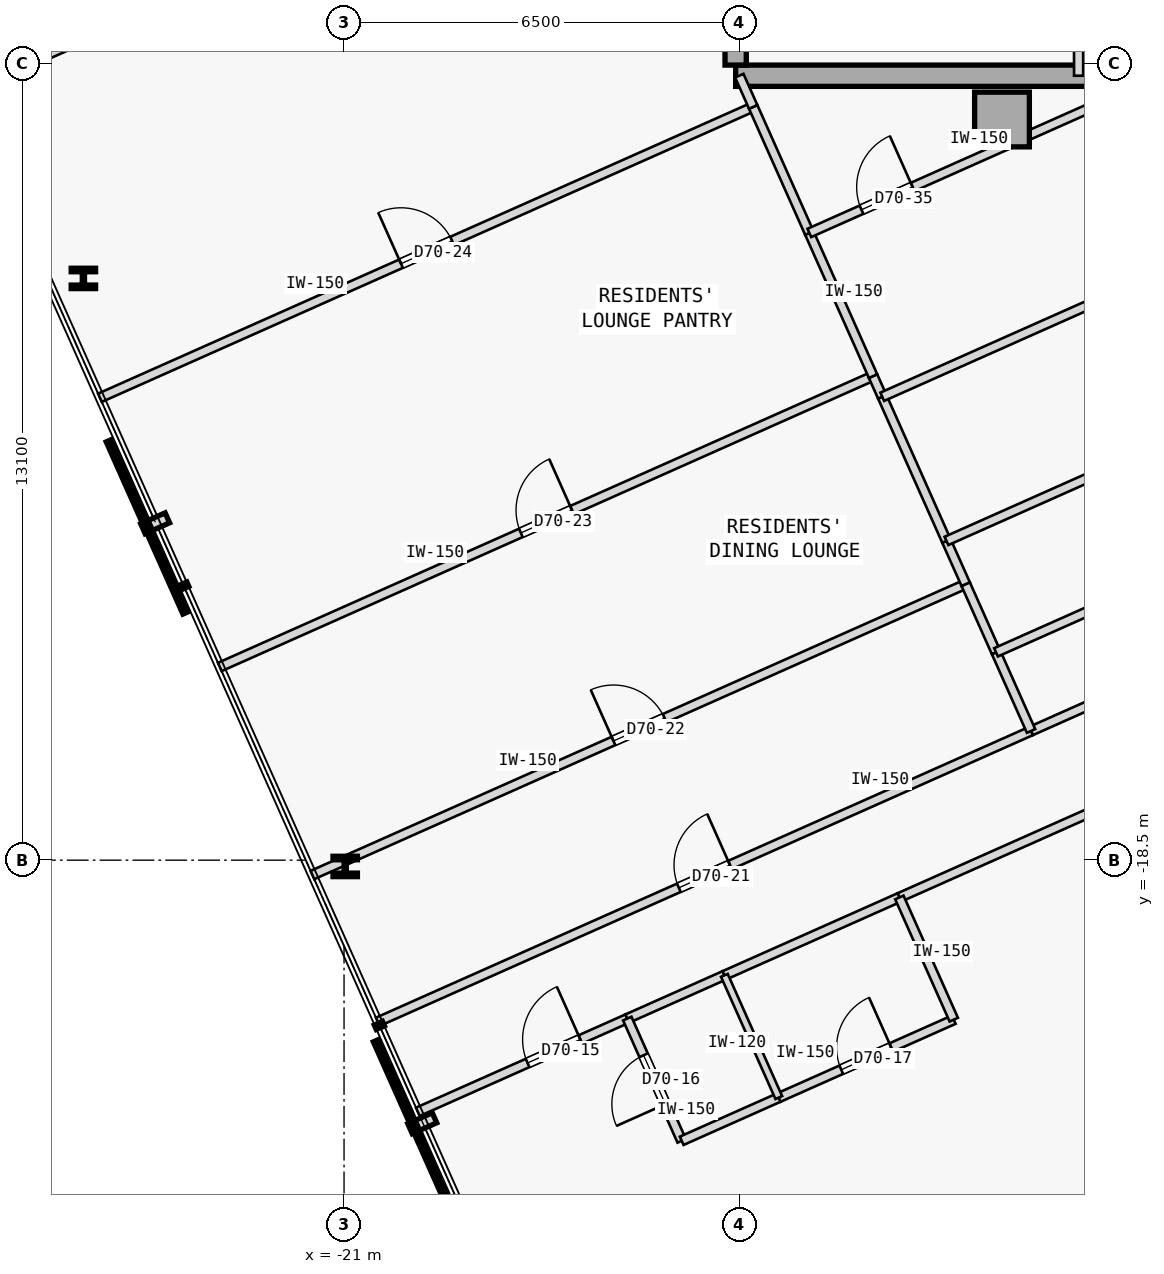
"""IFC4 building model, lengths in metres.
Left out: names, types, materials, properties, quantities, classifications, styles, units other than length and angle.
Written with IfcOpenShell. Run it as: python <this file> out.ifc"""

import sys

from ifc_helpers import new_model, si_unit, direction, frame, frame_2d, origin, origin_2d, place, context, subcontext, project, spatial, rectangle, i_section, extrude, element, fill, save


model = new_model("IFC4")
c1 = context("Model", 3, precision=1e-05, world=origin(), true_north=direction((0.0, 1.0)))
c2 = subcontext(c1, "Body", "Model", "MODEL_VIEW")
j1 = project(units=[si_unit("LENGTHUNIT", "METRE"), si_unit("PLANEANGLEUNIT", "RADIAN")], contexts=[c1])
p1 = place(None, origin())
s1 = spatial("IfcSite", under=j1, at=p1, CompositionType="ELEMENT")
p2 = place(p1, origin())
s2 = spatial("IfcBuilding", under=s1, at=p2, CompositionType="ELEMENT")
p3 = place(p2, frame((0.0, 0.0, 262.2)))
s3 = spatial("IfcBuildingStorey", under=s2, at=p3, CompositionType="ELEMENT", Elevation=262.2)
p4 = place(p3, frame((-10.18, -6.32, 0.0), z_axis=(0.0, 0.0, 1.0), x_axis=(1.0, 0.0, 0.0)))
e1 = element("IfcColumn", 1, at=p4, inside=s3, PredefinedType="COLUMN", context=c2, shape_type="SweptSolid", body=[
    extrude(rectangle(XDim=0.9, YDim=0.9, at=origin_2d()), origin(), (0.0, 0.0, 1.0), 3.35),
])
p5 = place(p3, frame((-14.56, -5.6, 0.0), z_axis=(0.0, 0.0, 1.0), x_axis=(1.0, 0.0, 0.0)))
e2 = element("IfcWall", 2, at=p5, inside=s3, PredefinedType="SHEAR", context=c2, shape_type="SweptSolid", body=[
    extrude(rectangle(XDim=10.86, YDim=0.35, at=frame_2d((5.43, 0.0))), origin(), (0.0, 0.0, 1.0), 3.125),
])
p6 = place(p3, frame((-14.56, -5.425, 0.0), z_axis=(0.0, 0.0, 1.0), x_axis=(0.0, 1.0, 0.0)))
e3 = element("IfcWall", 3, at=p6, inside=s3, PredefinedType="SHEAR", context=c2, shape_type="SweptSolid", body=[
    extrude(rectangle(XDim=10.85, YDim=0.35, at=frame_2d((5.425, 0.0))), origin(), (0.0, 0.0, 1.0), 3.125),
])
for number, where, z_axis, x_axis in (
    (4, (-25.286, -8.933, 0.0), (0.0, 0.0, 1.0), (1.0, 0.0, 0.0)),
    (5, (-20.981, -18.603, 0.0), (0.0, 0.0, 1.0), (1.0, 0.0, 0.0)),
):
    element("IfcColumn", number, at=place(p3, frame(where, z_axis=z_axis, x_axis=x_axis)), inside=s3, PredefinedType="COLUMN", context=c2, shape_type="SweptSolid", body=[
        extrude(i_section(OverallWidth=0.401, OverallDepth=0.335, WebThickness=0.036, FlangeThickness=0.058, FilletRadius=0.015, at=origin_2d()), origin(), (0.0, 0.0, 1.0), 3.35),
    ])
p7 = place(p3, frame((-8.92, -5.6, 0.0), z_axis=(0.0, 0.0, 1.0), x_axis=(0.0, 1.0, 0.0)))
e6 = element("IfcWall", 6, at=p7, inside=s3, PredefinedType="PARTITIONING", context=c2, shape_type="SweptSolid", body=[
    extrude(rectangle(XDim=2.65, YDim=0.15, at=frame_2d((1.325, 0.0))), origin(), (0.0, 0.0, 1.0), 3.125),
])
p8 = place(p3, frame((-19.786, -22.639, 0.0), z_axis=(0.0, 0.0, 1.0), x_axis=(0.913541633228, 0.406745232743, 0.0)))
e7 = element("IfcWall", 7, at=p8, inside=s3, PredefinedType="PARTITIONING", context=c2, shape_type="SweptSolid", body=[
    extrude(rectangle(XDim=3.77, YDim=0.15, at=frame_2d((1.885, 0.0))), origin(), (0.0, 0.0, 1.0), 3.125),
])
p9 = place(p8, frame((1.976, 0.0, 0.0)))
e8 = element("IfcOpeningElement", 8, at=p9, cuts=e7, PredefinedType="OPENING", context=c2, shape_type="SweptSolid", body=[
    extrude(rectangle(XDim=0.95, YDim=2.15, at=frame_2d((0.475, 1.075))), frame((0.0, 0.085, 0.0), z_axis=(0.0, -1.0, 0.0), x_axis=(1.0, 0.0, 0.0)), (0.0, 0.0, 1.0), 0.17),
])
p10 = place(p3, frame((-11.868, -19.113, 0.0), z_axis=(0.0, 0.0, 1.0), x_axis=(0.913543802, 0.40674036169, 0.0)))
e9 = element("IfcWall", 9, at=p10, inside=s3, PredefinedType="PARTITIONING", context=c2, shape_type="SweptSolid", body=[
    extrude(rectangle(XDim=3.65, YDim=0.15, at=frame_2d((1.825, 0.0))), origin(), (0.0, 0.0, 1.0), 3.125),
])
p11 = place(p3, frame((-16.342, -21.105, 0.0), z_axis=(0.0, 0.0, 1.0), x_axis=(0.9135579554, 0.406708571492, 0.0)))
e10 = element("IfcWall", 10, at=p11, inside=s3, PredefinedType="PARTITIONING", context=c2, shape_type="SweptSolid", body=[
    extrude(rectangle(XDim=1.748, YDim=0.15, at=frame_2d((0.874, 0.0))), origin(), (0.0, 0.0, 1.0), 3.125),
])
p12 = place(p3, frame((-14.745, -20.394, 0.0), z_axis=(0.0, 0.0, 1.0), x_axis=(0.913542880558, 0.406742431252, 0.0)))
e11 = element("IfcWall", 11, at=p12, inside=s3, PredefinedType="PARTITIONING", context=c2, shape_type="SweptSolid", body=[
    extrude(rectangle(XDim=3.15, YDim=0.15, at=frame_2d((1.575, 0.0))), origin(), (0.0, 0.0, 1.0), 3.125),
])
p13 = place(p3, frame((-20.445, -21.159, 0.0), z_axis=(0.0, 0.0, 1.0), x_axis=(0.913547681516, 0.406731648137, 0.0)))
e12 = element("IfcWall", 12, at=p13, inside=s3, PredefinedType="PARTITIONING", context=c2, shape_type="SweptSolid", body=[
    extrude(rectangle(XDim=11.76, YDim=0.15, at=frame_2d((5.88, 0.0))), origin(), (0.0, 0.0, 1.0), 3.125),
])
p14 = place(p13, frame((5.42, 0.0, 0.0)))
e13 = element("IfcOpeningElement", 13, at=p14, cuts=e12, PredefinedType="OPENING", context=c2, shape_type="SweptSolid", body=[
    extrude(rectangle(XDim=0.92, YDim=2.15, at=frame_2d((0.46, 1.075))), frame((0.0, 0.085, 0.0), z_axis=(0.0, -1.0, 0.0), x_axis=(1.0, 0.0, 0.0)), (0.0, 0.0, 1.0), 0.17),
])
p15 = place(p3, frame((-9.702, -16.375, 0.0), z_axis=(0.0, 0.0, 1.0), x_axis=(0.913552389019, 0.406721074594, 0.0)))
e14 = element("IfcWall", 14, at=p15, inside=s3, PredefinedType="PARTITIONING", context=c2, shape_type="SweptSolid", body=[
    extrude(rectangle(XDim=6.57, YDim=0.15, at=frame_2d((3.285, 0.0))), origin(), (0.0, 0.0, 1.0), 3.125),
])
p16 = place(p15, frame((2.825, 0.0, 0.0)))
e15 = element("IfcOpeningElement", 15, at=p16, cuts=e14, PredefinedType="OPENING", context=c2, shape_type="SweptSolid", body=[
    extrude(rectangle(XDim=0.92, YDim=2.15, at=frame_2d((0.46, 1.075))), frame((0.0, 0.085, 0.0), z_axis=(0.0, -1.0, 0.0), x_axis=(1.0, 0.0, 0.0)), (0.0, 0.0, 1.0), 0.17),
])
p17 = place(p3, frame((-15.448, -23.115, 0.0), z_axis=(0.0, 0.0, 1.0), x_axis=(-0.406725294076, 0.913550510459, 0.0)))
e16 = element("IfcWall", 16, at=p17, inside=s3, PredefinedType="PARTITIONING", context=c2, shape_type="SweptSolid", body=[
    extrude(rectangle(XDim=2.2, YDim=0.15, at=frame_2d((1.1, 0.0))), origin(), (0.0, 0.0, 1.0), 3.125),
])
p18 = place(p17, frame((0.66, 0.0, 0.0)))
e17 = element("IfcOpeningElement", 17, at=p18, cuts=e16, PredefinedType="OPENING", context=c2, shape_type="SweptSolid", body=[
    extrude(rectangle(XDim=0.88, YDim=2.15, at=frame_2d((0.44, 1.075))), frame((0.0, 0.085, 0.0), z_axis=(0.0, -1.0, 0.0), x_axis=(1.0, 0.0, 0.0)), (0.0, 0.0, 1.0), 0.17),
])
p19 = place(p3, frame((-15.448, -23.115, 0.0), z_axis=(0.0, 0.0, 1.0), x_axis=(0.9135579554, 0.406708571492, 0.0)))
e18 = element("IfcWall", 18, at=p19, inside=s3, PredefinedType="PARTITIONING", context=c2, shape_type="SweptSolid", body=[
    extrude(rectangle(XDim=1.748, YDim=0.15, at=frame_2d((0.874, 0.0))), origin(), (0.0, 0.0, 1.0), 3.125),
])
p20 = place(p3, frame((-13.851, -22.404, 0.0), z_axis=(0.0, 0.0, 1.0), x_axis=(0.913542880558, 0.406742431252, 0.0)))
e19 = element("IfcWall", 19, at=p20, inside=s3, PredefinedType="PARTITIONING", context=c2, shape_type="SweptSolid", body=[
    extrude(rectangle(XDim=3.15, YDim=0.15, at=frame_2d((1.575, 0.0))), origin(), (0.0, 0.0, 1.0), 3.125),
])
p21 = place(p20, frame((1.125, 0.0, 0.0)))
e20 = element("IfcOpeningElement", 20, at=p21, cuts=e19, PredefinedType="OPENING", context=c2, shape_type="SweptSolid", body=[
    extrude(rectangle(XDim=0.9, YDim=2.15, at=frame_2d((0.45, 1.075))), frame((0.0, 0.085, 0.0), z_axis=(0.0, -1.0, 0.0), x_axis=(1.0, 0.0, 0.0)), (0.0, 0.0, 1.0), 0.17),
])
p22 = place(p3, frame((-10.973, -21.123, 0.0), z_axis=(0.0, 0.0, 1.0), x_axis=(-0.406725294076, 0.913550510459, 0.0)))
e21 = element("IfcWall", 21, at=p22, inside=s3, PredefinedType="PARTITIONING", context=c2, shape_type="SweptSolid", body=[
    extrude(rectangle(XDim=2.2, YDim=0.15, at=frame_2d((1.1, 0.0))), origin(), (0.0, 0.0, 1.0), 3.125),
])
p23 = place(p3, frame((-13.851, -22.404, 0.0), z_axis=(0.0, 0.0, 1.0), x_axis=(-0.406725294076, 0.913550510459, 0.0)))
e22 = element("IfcWall", 22, at=p23, inside=s3, PredefinedType="PARTITIONING", context=c2, shape_type="SweptSolid", body=[
    extrude(rectangle(XDim=2.2, YDim=0.12, at=frame_2d((1.1, 0.0))), origin(), (0.0, 0.0, 1.0), 3.125),
])
p24 = place(p3, frame((-21.52, -18.744, 0.0), z_axis=(0.0, 0.0, 1.0), x_axis=(0.913539967617, 0.406748973651, 0.0)))
e23 = element("IfcWall", 23, at=p24, inside=s3, PredefinedType="PARTITIONING", context=c2, shape_type="SweptSolid", body=[
    extrude(rectangle(XDim=11.76, YDim=0.15, at=frame_2d((5.88, 0.0))), origin(), (0.0, 0.0, 1.0), 3.125),
])
p25 = place(p24, frame((5.42, 0.0, 0.0)))
e24 = element("IfcOpeningElement", 24, at=p25, cuts=e23, PredefinedType="OPENING", context=c2, shape_type="SweptSolid", body=[
    extrude(rectangle(XDim=0.92, YDim=2.15, at=frame_2d((0.46, 1.075))), frame((0.0, 0.085, 0.0), z_axis=(0.0, -1.0, 0.0), x_axis=(1.0, 0.0, 0.0)), (0.0, 0.0, 1.0), 0.17),
])
p26 = place(p3, frame((-9.702, -16.375, 0.0), z_axis=(0.0, 0.0, 1.0), x_axis=(-0.406762319034, 0.913534025537, 0.0)))
e25 = element("IfcWall", 25, at=p26, inside=s3, PredefinedType="PARTITIONING", context=c2, shape_type="SweptSolid", body=[
    extrude(rectangle(XDim=1.416, YDim=0.15, at=frame_2d((0.708, 0.0))), origin(), (0.0, 0.0, 1.0), 3.125),
])
p27 = place(p3, frame((-10.278, -15.082, 0.0), z_axis=(0.0, 0.0, 1.0), x_axis=(-0.406655262741, 0.913581686159, 0.0)))
e26 = element("IfcWall", 26, at=p27, inside=s3, PredefinedType="PARTITIONING", context=c2, shape_type="SweptSolid", body=[
    extrude(rectangle(XDim=1.227, YDim=0.15, at=frame_2d((0.614, 0.0))), origin(), (0.0, 0.0, 1.0), 3.125),
])
p28 = place(p3, frame((-23.043, -15.323, 0.0), z_axis=(0.0, 0.0, 1.0), x_axis=(0.913547681516, 0.406731648137, 0.0)))
e27 = element("IfcWall", 27, at=p28, inside=s3, PredefinedType="PARTITIONING", context=c2, shape_type="SweptSolid", body=[
    extrude(rectangle(XDim=11.76, YDim=0.15, at=frame_2d((5.88, 0.0))), origin(), (0.0, 0.0, 1.0), 3.125),
])
p29 = place(p28, frame((5.42, 0.0, 0.0)))
e28 = element("IfcOpeningElement", 28, at=p29, cuts=e27, PredefinedType="OPENING", context=c2, shape_type="SweptSolid", body=[
    extrude(rectangle(XDim=0.92, YDim=2.15, at=frame_2d((0.46, 1.075))), frame((0.0, 0.085, 0.0), z_axis=(0.0, -1.0, 0.0), x_axis=(1.0, 0.0, 0.0)), (0.0, 0.0, 1.0), 0.17),
])
p30 = place(p3, frame((-10.777, -13.961, 0.0), z_axis=(0.0, 0.0, 1.0), x_axis=(-0.406720744325, 0.913552536057, 0.0)))
e29 = element("IfcWall", 29, at=p30, inside=s3, PredefinedType="PARTITIONING", context=c2, shape_type="SweptSolid", body=[
    extrude(rectangle(XDim=0.778, YDim=0.15, at=frame_2d((0.389, 0.0))), origin(), (0.0, 0.0, 1.0), 3.125),
])
p31 = place(p3, frame((-11.093, -13.25, 0.0), z_axis=(0.0, 0.0, 1.0), x_axis=(-0.406723252866, 0.91355141923, 0.0)))
e30 = element("IfcWall", 30, at=p31, inside=s3, PredefinedType="PARTITIONING", context=c2, shape_type="SweptSolid", body=[
    extrude(rectangle(XDim=2.595, YDim=0.15, at=frame_2d((1.297, 0.0))), origin(), (0.0, 0.0, 1.0), 3.125),
])
p32 = place(p3, frame((-12.149, -10.88, 0.0), z_axis=(0.0, 0.0, 1.0), x_axis=(-0.406868995548, 0.913486519037, 0.0)))
e31 = element("IfcWall", 31, at=p32, inside=s3, PredefinedType="PARTITIONING", context=c2, shape_type="SweptSolid", body=[
    extrude(rectangle(XDim=0.372, YDim=0.15, at=frame_2d((0.186, 0.0))), origin(), (0.0, 0.0, 1.0), 3.125),
])
p33 = place(p3, frame((-25.014, -10.896, 0.0), z_axis=(0.0, 0.0, 1.0), x_axis=(0.913544247064, 0.406739362069, 0.0)))
e32 = element("IfcWall", 32, at=p33, inside=s3, PredefinedType="PARTITIONING", context=c2, shape_type="SweptSolid", body=[
    extrude(rectangle(XDim=11.76, YDim=0.15, at=frame_2d((5.88, 0.0))), origin(), (0.0, 0.0, 1.0), 3.125),
])
p34 = place(p33, frame((5.42, 0.0, 0.0)))
e33 = element("IfcOpeningElement", 33, at=p34, cuts=e32, PredefinedType="OPENING", context=c2, shape_type="SweptSolid", body=[
    extrude(rectangle(XDim=0.92, YDim=2.15, at=frame_2d((0.46, 1.075))), frame((0.0, 0.085, 0.0), z_axis=(0.0, -1.0, 0.0), x_axis=(1.0, 0.0, 0.0)), (0.0, 0.0, 1.0), 0.17),
])
p35 = place(p3, frame((-12.3, -10.54, 0.0), z_axis=(0.0, 0.0, 1.0), x_axis=(-0.406788806475, 0.913522231216, 0.0)))
e34 = element("IfcWall", 34, at=p35, inside=s3, PredefinedType="PARTITIONING", context=c2, shape_type="SweptSolid", body=[
    extrude(rectangle(XDim=2.577, YDim=0.15, at=frame_2d((1.289, 0.0))), origin(), (0.0, 0.0, 1.0), 3.125),
])
p36 = place(p3, frame((-13.348, -8.186, 0.0), z_axis=(0.0, 0.0, 1.0), x_axis=(-0.40673740295, 0.913545119324, 0.0)))
e35 = element("IfcWall", 35, at=p36, inside=s3, PredefinedType="PARTITIONING", context=c2, shape_type="SweptSolid", body=[
    extrude(rectangle(XDim=2.269, YDim=0.15, at=frame_2d((1.134, 0.0))), origin(), (0.0, 0.0, 1.0), 3.125),
])
p37 = place(p3, frame((-27.254, -5.865, 0.0), z_axis=(0.0, 0.0, 1.0), x_axis=(0.913547681516, 0.406731648137, 0.0)))
e36 = element("IfcWall", 36, at=p37, inside=s3, PredefinedType="PARTITIONING", context=c2, shape_type="SweptSolid", body=[
    extrude(rectangle(XDim=11.76, YDim=0.15, at=frame_2d((5.88, 0.0))), origin(), (0.0, 0.0, 1.0), 3.125),
])
p38 = place(p3, frame((-14.271, -6.113, 0.0), z_axis=(0.0, 0.0, 1.0), x_axis=(-0.406622099206, 0.913596447255, 0.0)))
e37 = element("IfcWall", 37, at=p38, inside=s3, PredefinedType="PARTITIONING", context=c2, shape_type="SweptSolid", body=[
    extrude(rectangle(XDim=0.562, YDim=0.15, at=frame_2d((0.281, 0.0))), origin(), (0.0, 0.0, 1.0), 3.125),
])
p39 = place(p3, frame((-10.278, -15.082, 0.0), z_axis=(0.0, 0.0, 1.0), x_axis=(0.913549882956, 0.406726703513, 0.0)))
e38 = element("IfcWall", 38, at=p39, inside=s3, PredefinedType="PARTITIONING", context=c2, shape_type="SweptSolid", body=[
    extrude(rectangle(XDim=7.2, YDim=0.15, at=frame_2d((3.6, 0.0))), origin(), (0.0, 0.0, 1.0), 3.125),
])
p40 = place(p3, frame((-11.093, -13.25, 0.0), z_axis=(0.0, 0.0, 1.0), x_axis=(0.913543891457, 0.406740160767, 0.0)))
e39 = element("IfcWall", 39, at=p40, inside=s3, PredefinedType="PARTITIONING", context=c2, shape_type="SweptSolid", body=[
    extrude(rectangle(XDim=8.093, YDim=0.15, at=frame_2d((4.046, 0.0))), origin(), (0.0, 0.0, 1.0), 3.125),
])
p41 = place(p3, frame((-12.149, -10.88, 0.0), z_axis=(0.0, 0.0, 1.0), x_axis=(0.913542450291, 0.406743397631, 0.0)))
e40 = element("IfcWall", 40, at=p41, inside=s3, PredefinedType="PARTITIONING", context=c2, shape_type="SweptSolid", body=[
    extrude(rectangle(XDim=9.248, YDim=0.15, at=frame_2d((4.624, 0.0))), origin(), (0.0, 0.0, 1.0), 3.125),
])
p42 = place(p3, frame((-13.348, -8.186, 0.0), z_axis=(0.0, 0.0, 1.0), x_axis=(0.913551673432, 0.406722681896, 0.0)))
e41 = element("IfcWall", 41, at=p42, inside=s3, PredefinedType="PARTITIONING", context=c2, shape_type="SweptSolid", body=[
    extrude(rectangle(XDim=6.358, YDim=0.15, at=frame_2d((3.179, 0.0))), origin(), (0.0, 0.0, 1.0), 3.125),
])
p43 = place(p42, frame((0.939, 0.0, 0.0)))
e42 = element("IfcOpeningElement", 42, at=p43, cuts=e41, PredefinedType="OPENING", context=c2, shape_type="SweptSolid", body=[
    extrude(rectangle(XDim=0.92, YDim=2.15, at=frame_2d((0.46, 1.075))), frame((0.0, 0.085, 0.0), z_axis=(0.0, -1.0, 0.0), x_axis=(1.0, 0.0, 0.0)), (0.0, 0.0, 1.0), 0.17),
])
p44 = place(p9, origin())
e43 = element("IfcDoor", 43, at=p44, inside=s3, OperationType="SINGLE_SWING_RIGHT", PredefinedType="DOOR", context=c2, shape_type="SweptSolid", body=[
    extrude(rectangle(XDim=0.95, YDim=2.15, at=frame_2d((0.475, 1.075))), frame((0.0, 0.025, 0.0), z_axis=(0.0, -1.0, 0.0), x_axis=(1.0, 0.0, 0.0)), (0.0, 0.0, 1.0), 0.05),
])
fill(e8, e43)
p45 = place(p18, origin())
e44 = element("IfcDoor", 44, at=p45, inside=s3, OperationType="SINGLE_SWING_LEFT", PredefinedType="DOOR", context=c2, shape_type="SweptSolid", body=[
    extrude(rectangle(XDim=0.88, YDim=2.15, at=frame_2d((0.44, 1.075))), frame((0.0, 0.025, 0.0), z_axis=(0.0, -1.0, 0.0), x_axis=(1.0, 0.0, 0.0)), (0.0, 0.0, 1.0), 0.05),
])
fill(e17, e44)
p46 = place(p21, origin())
e45 = element("IfcDoor", 45, at=p46, inside=s3, OperationType="SINGLE_SWING_RIGHT", PredefinedType="DOOR", context=c2, shape_type="SweptSolid", body=[
    extrude(rectangle(XDim=0.9, YDim=2.15, at=frame_2d((0.45, 1.075))), frame((0.0, 0.025, 0.0), z_axis=(0.0, -1.0, 0.0), x_axis=(1.0, 0.0, 0.0)), (0.0, 0.0, 1.0), 0.05),
])
fill(e20, e45)
p47 = place(p14, origin())
e46 = element("IfcDoor", 46, at=p47, inside=s3, OperationType="SINGLE_SWING_RIGHT", PredefinedType="DOOR", context=c2, shape_type="SweptSolid", body=[
    extrude(rectangle(XDim=0.92, YDim=2.15, at=frame_2d((0.46, 1.075))), frame((0.0, 0.025, 0.0), z_axis=(0.0, -1.0, 0.0), x_axis=(1.0, 0.0, 0.0)), (0.0, 0.0, 1.0), 0.05),
])
fill(e13, e46)
p48 = place(p25, origin())
e47 = element("IfcDoor", 47, at=p48, inside=s3, OperationType="SINGLE_SWING_LEFT", PredefinedType="DOOR", context=c2, shape_type="SweptSolid", body=[
    extrude(rectangle(XDim=0.92, YDim=2.15, at=frame_2d((0.46, 1.075))), frame((0.0, 0.025, 0.0), z_axis=(0.0, -1.0, 0.0), x_axis=(1.0, 0.0, 0.0)), (0.0, 0.0, 1.0), 0.05),
])
fill(e24, e47)
p49 = place(p29, origin())
e48 = element("IfcDoor", 48, at=p49, inside=s3, OperationType="SINGLE_SWING_RIGHT", PredefinedType="DOOR", context=c2, shape_type="SweptSolid", body=[
    extrude(rectangle(XDim=0.92, YDim=2.15, at=frame_2d((0.46, 1.075))), frame((0.0, 0.025, 0.0), z_axis=(0.0, -1.0, 0.0), x_axis=(1.0, 0.0, 0.0)), (0.0, 0.0, 1.0), 0.05),
])
fill(e28, e48)
p50 = place(p34, origin())
e49 = element("IfcDoor", 49, at=p50, inside=s3, OperationType="SINGLE_SWING_LEFT", PredefinedType="DOOR", context=c2, shape_type="SweptSolid", body=[
    extrude(rectangle(XDim=0.92, YDim=2.15, at=frame_2d((0.46, 1.075))), frame((0.0, 0.025, 0.0), z_axis=(0.0, -1.0, 0.0), x_axis=(1.0, 0.0, 0.0)), (0.0, 0.0, 1.0), 0.05),
])
fill(e33, e49)
p51 = place(p43, origin())
e50 = element("IfcDoor", 50, at=p51, inside=s3, OperationType="SINGLE_SWING_RIGHT", PredefinedType="DOOR", context=c2, shape_type="SweptSolid", body=[
    extrude(rectangle(XDim=0.92, YDim=2.15, at=frame_2d((0.46, 1.075))), frame((0.0, 0.025, 0.0), z_axis=(0.0, -1.0, 0.0), x_axis=(1.0, 0.0, 0.0)), (0.0, 0.0, 1.0), 0.05),
])
fill(e42, e50)
save(model, sys.argv[1])
